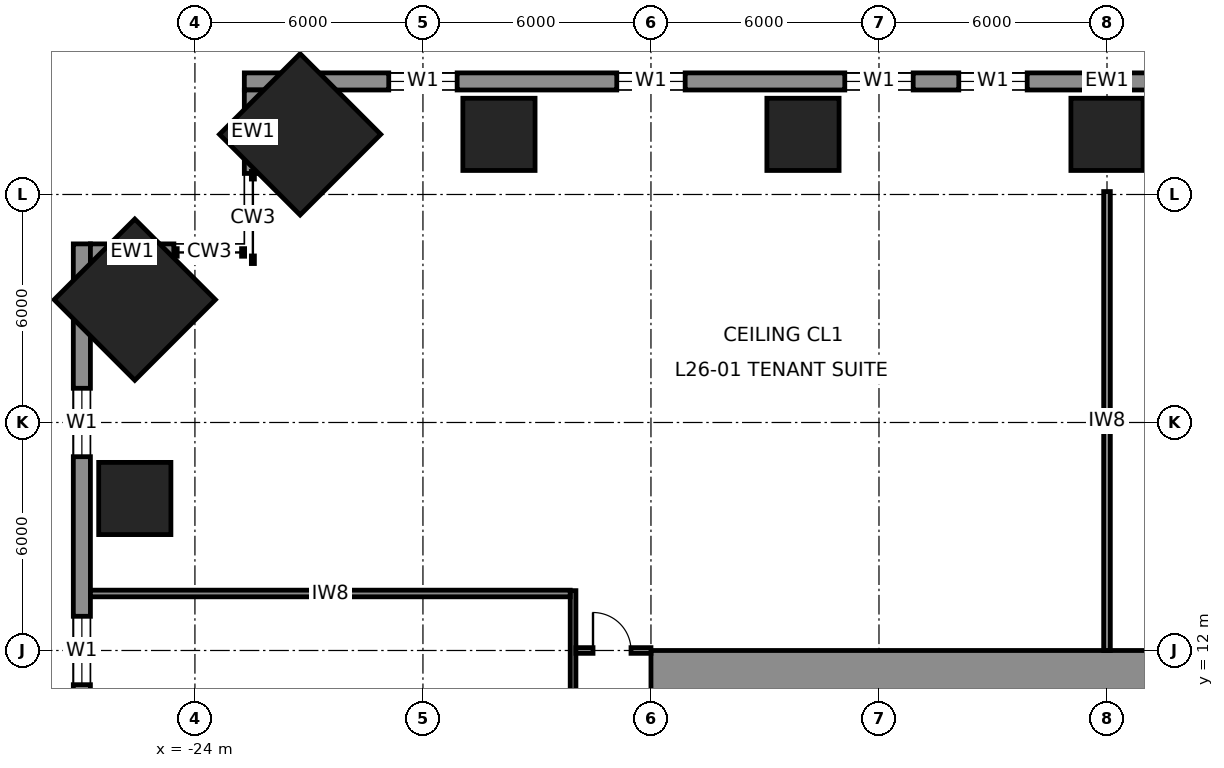
"""IFC4 building model, lengths in metres.
Left out: names, types, materials, properties, quantities, classifications, styles, units other than length and angle.
Written with IfcOpenShell. Run it as: python <this file> out.ifc"""

import sys

from ifc_helpers import new_model, si_unit, direction, frame, frame_2d, origin, origin_2d, place, context, subcontext, project, spatial, rectangle, extrude, element, fill, save


model = new_model("IFC4")
c1 = context("Model", 3, precision=1e-05, world=origin(), true_north=direction((0.0, 1.0)))
c2 = subcontext(c1, "Body", "Model", "MODEL_VIEW")
j1 = project(units=[si_unit("LENGTHUNIT", "METRE"), si_unit("PLANEANGLEUNIT", "RADIAN")], contexts=[c1])
p1 = place(None, origin())
s1 = spatial("IfcSite", under=j1, at=p1, CompositionType="ELEMENT")
p2 = place(p1, origin())
s2 = spatial("IfcBuilding", under=s1, at=p2, CompositionType="ELEMENT")
p3 = place(p2, frame((0.0, 0.0, 131.8)))
s3 = spatial("IfcBuildingStorey", under=s2, at=p3, CompositionType="ELEMENT", Elevation=131.8)
for number, where, z_axis, x_axis in (
    (1, (-25.582, 21.232, 0.0), (0.04, -0.04, 0.998), (0.707, 0.708, 0.0)),
    (2, (-21.232, 25.582, 0.0), (0.04, -0.04, 0.998), (0.708, 0.707, 0.0)),
):
    element("IfcColumn", number, at=place(p3, frame(where, z_axis=z_axis, x_axis=x_axis)), inside=s3, PredefinedType="COLUMN", context=c2, shape_type="SweptSolid", body=[
        extrude(rectangle(XDim=3.0, YDim=3.0, at=origin_2d()), origin(), (0.0, 0.0, 1.0), 4.007),
    ])
for number, where, z_axis, x_axis in (
    (3, (0.0, 25.582, 0.0), (0.0, -0.04, 0.999), (1.0, 0.0, 0.0)),
    (4, (-8.0, 25.582, 0.0), (0.0, -0.04, 0.999), (1.0, 0.0, 0.0)),
    (5, (-16.0, 25.582, 0.0), (0.0, -0.04, 0.999), (1.0, 0.0, 0.0)),
    (6, (-25.582, 16.0, 0.0), (0.04, 0.0, 0.999), (0.0, 1.0, 0.0)),
):
    element("IfcColumn", number, at=place(p3, frame(where, z_axis=z_axis, x_axis=x_axis)), inside=s3, PredefinedType="COLUMN", context=c2, shape_type="SweptSolid", body=[
        extrude(rectangle(XDim=1.9, YDim=1.9, at=origin_2d()), origin(), (0.0, 0.0, 1.0), 4.003),
    ])
p4 = place(p3, frame((-12.0, 11.25, 0.0), z_axis=(0.0, 0.0, 1.0), x_axis=(1.0, 0.0, 0.0)))
e7 = element("IfcWall", 7, at=p4, inside=s3, PredefinedType="SHEAR", context=c2, shape_type="SweptSolid", body=[
    extrude(rectangle(XDim=24.0, YDim=1.5, at=frame_2d((12.0, 0.0))), origin(), (0.0, 0.0, 1.0), 4.0),
])
p5 = place(p3, frame((22.7, 26.975, 0.0), z_axis=(0.0, 0.0, 1.0), x_axis=(-1.0, 0.0, 0.0)))
e8 = element("IfcWall", 8, at=p5, inside=s3, PredefinedType="SOLIDWALL", context=c2, shape_type="SweptSolid", body=[
    extrude(rectangle(XDim=45.4, YDim=0.45, at=frame_2d((22.7, 0.0))), origin(), (0.0, 0.0, 1.0), 3.83),
])
p6 = place(p5, frame((3.8, 0.0, 0.7)))
e9 = element("IfcOpeningElement", 9, at=p6, cuts=e8, PredefinedType="OPENING", context=c2, shape_type="SweptSolid", body=[
    extrude(rectangle(XDim=1.8, YDim=2.6, at=frame_2d((0.9, 1.3))), frame((0.0, 0.235, 0.0), z_axis=(0.0, -1.0, 0.0), x_axis=(1.0, 0.0, 0.0)), (0.0, 0.0, 1.0), 0.47),
])
p7 = place(p5, frame((9.8, 0.0, 0.7)))
e10 = element("IfcOpeningElement", 10, at=p7, cuts=e8, PredefinedType="OPENING", context=c2, shape_type="SweptSolid", body=[
    extrude(rectangle(XDim=1.8, YDim=2.6, at=frame_2d((0.9, 1.3))), frame((0.0, 0.235, 0.0), z_axis=(0.0, -1.0, 0.0), x_axis=(1.0, 0.0, 0.0)), (0.0, 0.0, 1.0), 0.47),
])
p8 = place(p5, frame((15.8, 0.0, 0.7)))
e11 = element("IfcOpeningElement", 11, at=p8, cuts=e8, PredefinedType="OPENING", context=c2, shape_type="SweptSolid", body=[
    extrude(rectangle(XDim=1.8, YDim=2.6, at=frame_2d((0.9, 1.3))), frame((0.0, 0.235, 0.0), z_axis=(0.0, -1.0, 0.0), x_axis=(1.0, 0.0, 0.0)), (0.0, 0.0, 1.0), 0.47),
])
p9 = place(p5, frame((18.8, 0.0, 0.7)))
e12 = element("IfcOpeningElement", 12, at=p9, cuts=e8, PredefinedType="OPENING", context=c2, shape_type="SweptSolid", body=[
    extrude(rectangle(XDim=1.8, YDim=2.6, at=frame_2d((0.9, 1.3))), frame((0.0, 0.235, 0.0), z_axis=(0.0, -1.0, 0.0), x_axis=(1.0, 0.0, 0.0)), (0.0, 0.0, 1.0), 0.47),
])
p10 = place(p5, frame((24.8, 0.0, 0.7)))
e13 = element("IfcOpeningElement", 13, at=p10, cuts=e8, PredefinedType="OPENING", context=c2, shape_type="SweptSolid", body=[
    extrude(rectangle(XDim=1.8, YDim=2.6, at=frame_2d((0.9, 1.3))), frame((0.0, 0.235, 0.0), z_axis=(0.0, -1.0, 0.0), x_axis=(1.0, 0.0, 0.0)), (0.0, 0.0, 1.0), 0.47),
])
p11 = place(p5, frame((27.8, 0.0, 0.7)))
e14 = element("IfcOpeningElement", 14, at=p11, cuts=e8, PredefinedType="OPENING", context=c2, shape_type="SweptSolid", body=[
    extrude(rectangle(XDim=1.8, YDim=2.6, at=frame_2d((0.9, 1.3))), frame((0.0, 0.235, 0.0), z_axis=(0.0, -1.0, 0.0), x_axis=(1.0, 0.0, 0.0)), (0.0, 0.0, 1.0), 0.47),
])
p12 = place(p5, frame((33.8, 0.0, 0.7)))
e15 = element("IfcOpeningElement", 15, at=p12, cuts=e8, PredefinedType="OPENING", context=c2, shape_type="SweptSolid", body=[
    extrude(rectangle(XDim=1.8, YDim=2.6, at=frame_2d((0.9, 1.3))), frame((0.0, 0.235, 0.0), z_axis=(0.0, -1.0, 0.0), x_axis=(1.0, 0.0, 0.0)), (0.0, 0.0, 1.0), 0.47),
])
p13 = place(p5, frame((39.8, 0.0, 0.7)))
e16 = element("IfcOpeningElement", 16, at=p13, cuts=e8, PredefinedType="OPENING", context=c2, shape_type="SweptSolid", body=[
    extrude(rectangle(XDim=1.8, YDim=2.6, at=frame_2d((0.9, 1.3))), frame((0.0, 0.235, 0.0), z_axis=(0.0, -1.0, 0.0), x_axis=(1.0, 0.0, 0.0)), (0.0, 0.0, 1.0), 0.47),
])
p14 = place(p3, frame((-26.975, 22.7, 0.0), z_axis=(0.0, 0.0, 1.0), x_axis=(0.0, -1.0, 0.0)))
e17 = element("IfcWall", 17, at=p14, inside=s3, PredefinedType="SOLIDWALL", context=c2, shape_type="SweptSolid", body=[
    extrude(rectangle(XDim=45.4, YDim=0.45, at=frame_2d((22.7, 0.0))), origin(), (0.0, 0.0, 1.0), 3.83),
])
p15 = place(p14, frame((3.8, 0.0, 0.7)))
e18 = element("IfcOpeningElement", 18, at=p15, cuts=e17, PredefinedType="OPENING", context=c2, shape_type="SweptSolid", body=[
    extrude(rectangle(XDim=1.8, YDim=2.6, at=frame_2d((0.9, 1.3))), frame((0.0, 0.235, 0.0), z_axis=(0.0, -1.0, 0.0), x_axis=(1.0, 0.0, 0.0)), (0.0, 0.0, 1.0), 0.47),
])
p16 = place(p14, frame((9.8, 0.0, 0.7)))
e19 = element("IfcOpeningElement", 19, at=p16, cuts=e17, PredefinedType="OPENING", context=c2, shape_type="SweptSolid", body=[
    extrude(rectangle(XDim=1.8, YDim=2.6, at=frame_2d((0.9, 1.3))), frame((0.0, 0.235, 0.0), z_axis=(0.0, -1.0, 0.0), x_axis=(1.0, 0.0, 0.0)), (0.0, 0.0, 1.0), 0.47),
])
p17 = place(p14, frame((15.8, 0.0, 0.7)))
e20 = element("IfcOpeningElement", 20, at=p17, cuts=e17, PredefinedType="OPENING", context=c2, shape_type="SweptSolid", body=[
    extrude(rectangle(XDim=1.8, YDim=2.6, at=frame_2d((0.9, 1.3))), frame((0.0, 0.235, 0.0), z_axis=(0.0, -1.0, 0.0), x_axis=(1.0, 0.0, 0.0)), (0.0, 0.0, 1.0), 0.47),
])
p18 = place(p14, frame((18.8, 0.0, 0.7)))
e21 = element("IfcOpeningElement", 21, at=p18, cuts=e17, PredefinedType="OPENING", context=c2, shape_type="SweptSolid", body=[
    extrude(rectangle(XDim=1.8, YDim=2.6, at=frame_2d((0.9, 1.3))), frame((0.0, 0.235, 0.0), z_axis=(0.0, -1.0, 0.0), x_axis=(1.0, 0.0, 0.0)), (0.0, 0.0, 1.0), 0.47),
])
p19 = place(p14, frame((24.8, 0.0, 0.7)))
e22 = element("IfcOpeningElement", 22, at=p19, cuts=e17, PredefinedType="OPENING", context=c2, shape_type="SweptSolid", body=[
    extrude(rectangle(XDim=1.8, YDim=2.6, at=frame_2d((0.9, 1.3))), frame((0.0, 0.235, 0.0), z_axis=(0.0, -1.0, 0.0), x_axis=(1.0, 0.0, 0.0)), (0.0, 0.0, 1.0), 0.47),
])
p20 = place(p14, frame((27.8, 0.0, 0.7)))
e23 = element("IfcOpeningElement", 23, at=p20, cuts=e17, PredefinedType="OPENING", context=c2, shape_type="SweptSolid", body=[
    extrude(rectangle(XDim=1.8, YDim=2.6, at=frame_2d((0.9, 1.3))), frame((0.0, 0.235, 0.0), z_axis=(0.0, -1.0, 0.0), x_axis=(1.0, 0.0, 0.0)), (0.0, 0.0, 1.0), 0.47),
])
p21 = place(p14, frame((33.8, 0.0, 0.7)))
e24 = element("IfcOpeningElement", 24, at=p21, cuts=e17, PredefinedType="OPENING", context=c2, shape_type="SweptSolid", body=[
    extrude(rectangle(XDim=1.8, YDim=2.6, at=frame_2d((0.9, 1.3))), frame((0.0, 0.235, 0.0), z_axis=(0.0, -1.0, 0.0), x_axis=(1.0, 0.0, 0.0)), (0.0, 0.0, 1.0), 0.47),
])
p22 = place(p14, frame((39.8, 0.0, 0.7)))
e25 = element("IfcOpeningElement", 25, at=p22, cuts=e17, PredefinedType="OPENING", context=c2, shape_type="SweptSolid", body=[
    extrude(rectangle(XDim=1.8, YDim=2.6, at=frame_2d((0.9, 1.3))), frame((0.0, 0.235, 0.0), z_axis=(0.0, -1.0, 0.0), x_axis=(1.0, 0.0, 0.0)), (0.0, 0.0, 1.0), 0.47),
])
for number, where, z_axis, x_axis in (
    (26, (-22.475, 24.554, 0.0), (0.0, 0.0, 1.0), (0.0, 1.0, 0.0)),
    (27, (-24.554, 22.475, 0.0), (0.0, 0.0, 1.0), (-1.0, 0.0, 0.0)),
):
    element("IfcWall", number, at=place(p3, frame(where, z_axis=z_axis, x_axis=x_axis)), inside=s3, PredefinedType="SOLIDWALL", context=c2, shape_type="SweptSolid", body=[
        extrude(rectangle(XDim=2.196, YDim=0.45, at=frame_2d((1.098, 0.0))), origin(), (0.0, 0.0, 1.0), 3.83),
    ])
p23 = place(p3, frame((-14.05, 13.575, 0.0), z_axis=(0.0, 0.0, 1.0), x_axis=(0.0, -1.0, 0.0)))
e28 = element("IfcWall", 28, at=p23, inside=s3, PredefinedType="PARTITIONING", context=c2, shape_type="SweptSolid", body=[
    extrude(rectangle(XDim=27.55, YDim=0.15, at=frame_2d((13.775, 0.0))), origin(), (0.0, 0.0, 1.0), 3.83),
])
p24 = place(p23, frame((22.475, 0.0, 0.0)))
e29 = element("IfcOpeningElement", 29, at=p24, cuts=e28, PredefinedType="OPENING", context=c2, shape_type="SweptSolid", body=[
    extrude(rectangle(XDim=1.4, YDim=2.3, at=frame_2d((0.7, 1.15))), frame((0.0, 0.085, 0.0), z_axis=(0.0, -1.0, 0.0), x_axis=(1.0, 0.0, 0.0)), (0.0, 0.0, 1.0), 0.17),
])
p25 = place(p23, frame((4.525, 0.0, 0.0)))
e30 = element("IfcOpeningElement", 30, at=p25, cuts=e28, PredefinedType="OPENING", context=c2, shape_type="SweptSolid", body=[
    extrude(rectangle(XDim=1.4, YDim=2.3, at=frame_2d((0.7, 1.15))), frame((0.0, 0.085, 0.0), z_axis=(0.0, -1.0, 0.0), x_axis=(1.0, 0.0, 0.0)), (0.0, 0.0, 1.0), 0.17),
])
p26 = place(p23, frame((16.825, 0.0, 0.0)))
e31 = element("IfcOpeningElement", 31, at=p26, cuts=e28, PredefinedType="OPENING", context=c2, shape_type="SweptSolid", body=[
    extrude(rectangle(XDim=1.0, YDim=2.3, at=frame_2d((0.5, 1.15))), frame((0.0, 0.085, 0.0), z_axis=(0.0, -1.0, 0.0), x_axis=(1.0, 0.0, 0.0)), (0.0, 0.0, 1.0), 0.17),
])
p27 = place(p23, frame((9.825, 0.0, 0.0)))
e32 = element("IfcOpeningElement", 32, at=p27, cuts=e28, PredefinedType="OPENING", context=c2, shape_type="SweptSolid", body=[
    extrude(rectangle(XDim=1.0, YDim=2.3, at=frame_2d((0.5, 1.15))), frame((0.0, 0.085, 0.0), z_axis=(0.0, -1.0, 0.0), x_axis=(1.0, 0.0, 0.0)), (0.0, 0.0, 1.0), 0.17),
])
p28 = place(p3, frame((-13.975, 12.0, 0.0), z_axis=(0.0, 0.0, 1.0), x_axis=(1.0, 0.0, 0.0)))
e33 = element("IfcWall", 33, at=p28, inside=s3, PredefinedType="PARTITIONING", context=c2, shape_type="SweptSolid", body=[
    extrude(rectangle(XDim=1.975, YDim=0.15, at=frame_2d((0.988, 0.0))), origin(), (0.0, 0.0, 1.0), 3.83),
])
p29 = place(p28, frame((0.45, 0.0, 0.0)))
e34 = element("IfcOpeningElement", 34, at=p29, cuts=e33, PredefinedType="OPENING", context=c2, shape_type="SweptSolid", body=[
    extrude(rectangle(XDim=1.0, YDim=2.3, at=frame_2d((0.5, 1.15))), frame((0.0, 0.085, 0.0), z_axis=(0.0, -1.0, 0.0), x_axis=(1.0, 0.0, 0.0)), (0.0, 0.0, 1.0), 0.17),
])
p30 = place(p3, frame((-26.75, 13.5, 0.0), z_axis=(0.0, 0.0, 1.0), x_axis=(1.0, 0.0, 0.0)))
e35 = element("IfcWall", 35, at=p30, inside=s3, PredefinedType="PARTITIONING", context=c2, shape_type="SweptSolid", body=[
    extrude(rectangle(XDim=12.625, YDim=0.175, at=frame_2d((6.312, 0.0))), origin(), (0.0, 0.0, 1.0), 3.83),
])
p31 = place(p3, frame((0.0, 12.0, 0.0), z_axis=(0.0, 0.0, 1.0), x_axis=(0.0, 1.0, 0.0)))
e36 = element("IfcWall", 36, at=p31, inside=s3, PredefinedType="PARTITIONING", context=c2, shape_type="SweptSolid", body=[
    extrude(rectangle(XDim=12.077, YDim=0.175, at=frame_2d((6.039, 0.0))), origin(), (0.0, 0.0, 1.0), 2.83),
])
p32 = place(p10, origin())
e37 = element("IfcWindow", 37, at=p32, inside=s3, PartitioningType="SINGLE_PANEL", PredefinedType="WINDOW", context=c2, shape_type="SweptSolid", body=[
    extrude(rectangle(XDim=1.8, YDim=2.6, at=frame_2d((0.9, 1.3))), frame((0.0, 0.03, 0.0), z_axis=(0.0, -1.0, 0.0), x_axis=(1.0, 0.0, 0.0)), (0.0, 0.0, 1.0), 0.06),
])
fill(e13, e37)
p33 = place(p11, origin())
e38 = element("IfcWindow", 38, at=p33, inside=s3, PartitioningType="SINGLE_PANEL", PredefinedType="WINDOW", context=c2, shape_type="SweptSolid", body=[
    extrude(rectangle(XDim=1.8, YDim=2.6, at=frame_2d((0.9, 1.3))), frame((0.0, 0.03, 0.0), z_axis=(0.0, -1.0, 0.0), x_axis=(1.0, 0.0, 0.0)), (0.0, 0.0, 1.0), 0.06),
])
fill(e14, e38)
p34 = place(p12, origin())
e39 = element("IfcWindow", 39, at=p34, inside=s3, PartitioningType="SINGLE_PANEL", PredefinedType="WINDOW", context=c2, shape_type="SweptSolid", body=[
    extrude(rectangle(XDim=1.8, YDim=2.6, at=frame_2d((0.9, 1.3))), frame((0.0, 0.03, 0.0), z_axis=(0.0, -1.0, 0.0), x_axis=(1.0, 0.0, 0.0)), (0.0, 0.0, 1.0), 0.06),
])
fill(e15, e39)
p35 = place(p13, origin())
e40 = element("IfcWindow", 40, at=p35, inside=s3, PartitioningType="SINGLE_PANEL", PredefinedType="WINDOW", context=c2, shape_type="SweptSolid", body=[
    extrude(rectangle(XDim=1.8, YDim=2.6, at=frame_2d((0.9, 1.3))), frame((0.0, 0.03, 0.0), z_axis=(0.0, -1.0, 0.0), x_axis=(1.0, 0.0, 0.0)), (0.0, 0.0, 1.0), 0.06),
])
fill(e16, e40)
p36 = place(p15, origin())
e41 = element("IfcWindow", 41, at=p36, inside=s3, PartitioningType="SINGLE_PANEL", PredefinedType="WINDOW", context=c2, shape_type="SweptSolid", body=[
    extrude(rectangle(XDim=1.8, YDim=2.6, at=frame_2d((0.9, 1.3))), frame((0.0, 0.03, 0.0), z_axis=(0.0, -1.0, 0.0), x_axis=(1.0, 0.0, 0.0)), (0.0, 0.0, 1.0), 0.06),
])
fill(e18, e41)
p37 = place(p16, origin())
e42 = element("IfcWindow", 42, at=p37, inside=s3, PartitioningType="SINGLE_PANEL", PredefinedType="WINDOW", context=c2, shape_type="SweptSolid", body=[
    extrude(rectangle(XDim=1.8, YDim=2.6, at=frame_2d((0.9, 1.3))), frame((0.0, 0.03, 0.0), z_axis=(0.0, -1.0, 0.0), x_axis=(1.0, 0.0, 0.0)), (0.0, 0.0, 1.0), 0.06),
])
fill(e19, e42)
p38 = place(p29, origin())
e43 = element("IfcDoor", 43, at=p38, inside=s3, OperationType="SINGLE_SWING_LEFT", PredefinedType="DOOR", context=c2, shape_type="SweptSolid", body=[
    extrude(rectangle(XDim=1.0, YDim=2.3, at=frame_2d((0.5, 1.15))), frame((0.0, 0.025, 0.0), z_axis=(0.0, -1.0, 0.0), x_axis=(1.0, 0.0, 0.0)), (0.0, 0.0, 1.0), 0.05),
])
fill(e34, e43)
save(model, sys.argv[1])
